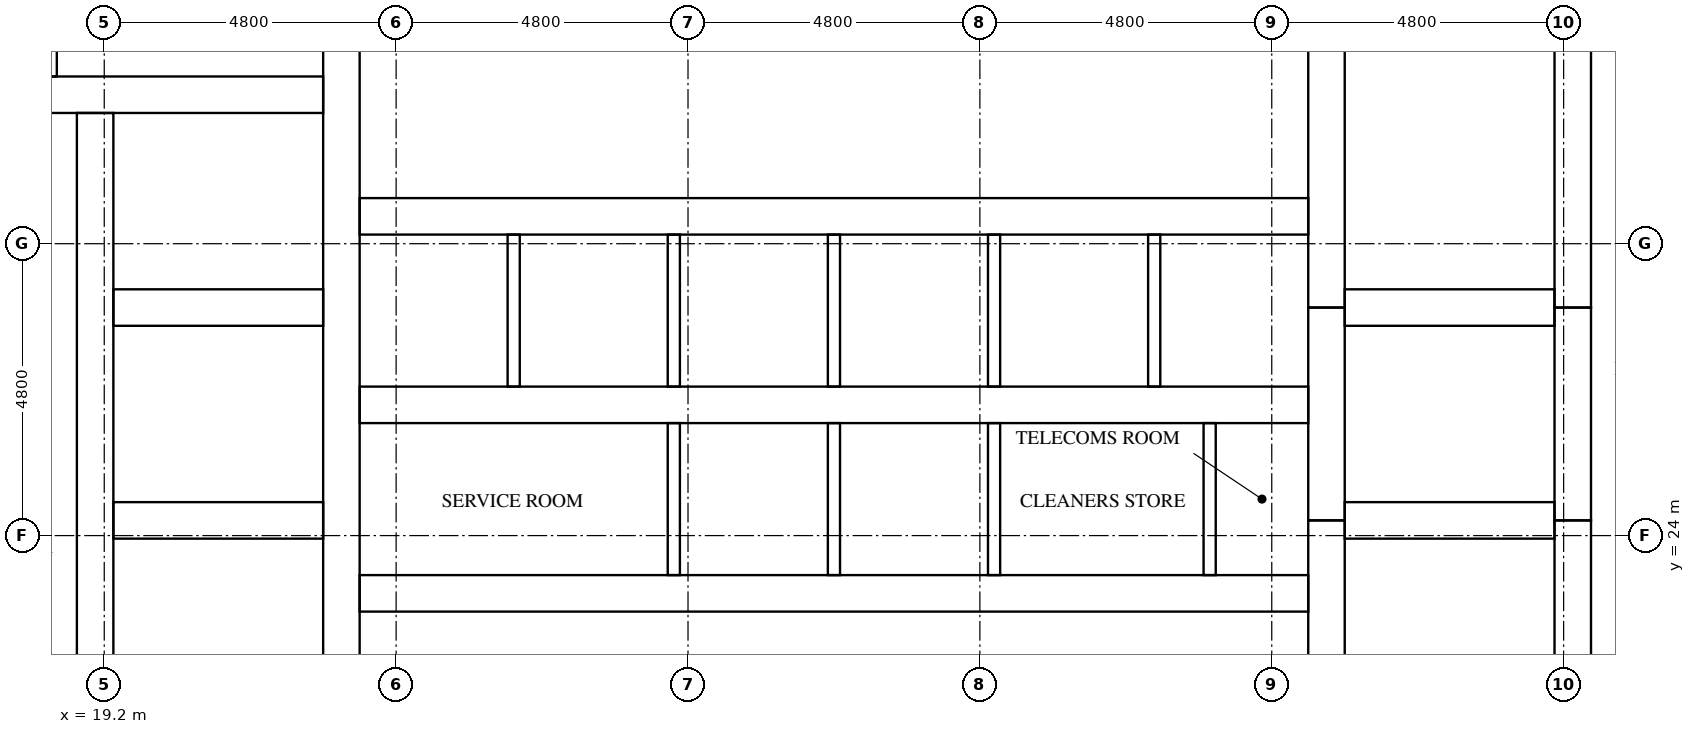
"""IFC4 building model, lengths in metres.
Left out: names, types, materials, properties, quantities, classifications, styles, units other than length and angle.
Written with IfcOpenShell. Run it as: python <this file> out.ifc"""

import sys

from ifc_helpers import new_model, si_unit, direction, frame, frame_2d, origin, place, context, subcontext, project, spatial, rectangle, extrude, element, fill, save


model = new_model("IFC4")
c1 = context("Model", 3, precision=1e-05, world=origin(), true_north=direction((0.0, 1.0)))
c2 = subcontext(c1, "Body", "Model", "MODEL_VIEW")
j1 = project(units=[si_unit("LENGTHUNIT", "METRE"), si_unit("PLANEANGLEUNIT", "RADIAN")], contexts=[c1])
p1 = place(None, origin())
s1 = spatial("IfcSite", under=j1, at=p1, CompositionType="ELEMENT")
p2 = place(p1, origin())
s2 = spatial("IfcBuilding", under=s1, at=p2, CompositionType="ELEMENT")
p3 = place(p2, frame((0.0, 0.0, 149.0)))
s3 = spatial("IfcBuildingStorey", under=s2, at=p3, CompositionType="ELEMENT", Elevation=149.0)
p4 = place(p3, frame((19.05, 15.8, 0.0), z_axis=(0.0, 0.0, 1.0), x_axis=(0.0, 1.0, 0.0)))
e1 = element("IfcWall", 1, at=p4, inside=s3, PredefinedType="SHEAR", context=c2, shape_type="SweptSolid", body=[
    extrude(rectangle(XDim=15.15, YDim=0.6, at=frame_2d((7.575, 0.0))), origin(), (0.0, 0.0, 1.0), 3.2),
])
p5 = place(p4, frame((9.65, 0.0, 0.0)))
e2 = element("IfcOpeningElement", 2, at=p5, cuts=e1, PredefinedType="OPENING", context=c2, shape_type="SweptSolid", body=[
    extrude(rectangle(XDim=1.1, YDim=2.1, at=frame_2d((0.55, 1.05))), frame((0.0, 0.31, 0.0), z_axis=(0.0, -1.0, 0.0), x_axis=(1.0, 0.0, 0.0)), (0.0, 0.0, 1.0), 0.62),
])
p6 = place(p4, frame((13.15, 0.0, 0.0)))
e3 = element("IfcOpeningElement", 3, at=p6, cuts=e1, PredefinedType="OPENING", context=c2, shape_type="SweptSolid", body=[
    extrude(rectangle(XDim=1.1, YDim=2.1, at=frame_2d((0.55, 1.05))), frame((0.0, 0.31, 0.0), z_axis=(0.0, -1.0, 0.0), x_axis=(1.0, 0.0, 0.0)), (0.0, 0.0, 1.0), 0.62),
])
p7 = place(p4, frame((0.4, 0.0, 0.0)))
e4 = element("IfcOpeningElement", 4, at=p7, cuts=e1, PredefinedType="OPENING", context=c2, shape_type="SweptSolid", body=[
    extrude(rectangle(XDim=1.2, YDim=2.1, at=frame_2d((0.6, 1.05))), frame((0.0, 0.31, 0.0), z_axis=(0.0, -1.0, 0.0), x_axis=(1.0, 0.0, 0.0)), (0.0, 0.0, 1.0), 0.62),
])
p8 = place(p3, frame((23.1, 15.8, 0.0), z_axis=(0.0, 0.0, 1.0), x_axis=(0.0, 1.0, 0.0)))
e5 = element("IfcWall", 5, at=p8, inside=s3, PredefinedType="SHEAR", context=c2, shape_type="SweptSolid", body=[
    extrude(rectangle(XDim=21.2, YDim=0.6, at=frame_2d((10.6, 0.0))), origin(), (0.0, 0.0, 1.0), 3.2),
])
p9 = place(p3, frame((39.3, 15.8, 0.0), z_axis=(0.0, 0.0, 1.0), x_axis=(0.0, 1.0, 0.0)))
e6 = element("IfcWall", 6, at=p9, inside=s3, PredefinedType="SHEAR", context=c2, shape_type="SweptSolid", body=[
    extrude(rectangle(XDim=8.45, YDim=0.6, at=frame_2d((4.225, 0.0))), origin(), (0.0, 0.0, 1.0), 3.2),
])
p10 = place(p3, frame((39.3, 24.25, 0.0), z_axis=(0.0, 0.0, 1.0), x_axis=(0.0, 1.0, 0.0)))
e7 = element("IfcWall", 7, at=p10, inside=s3, PredefinedType="SHEAR", context=c2, shape_type="SweptSolid", body=[
    extrude(rectangle(XDim=3.5, YDim=0.6, at=frame_2d((1.75, 0.0))), origin(), (0.0, 0.0, 1.0), 3.2),
])
p11 = place(p3, frame((39.3, 27.75, 0.0), z_axis=(0.0, 0.0, 1.0), x_axis=(0.0, 1.0, 0.0)))
e8 = element("IfcWall", 8, at=p11, inside=s3, PredefinedType="SHEAR", context=c2, shape_type="SweptSolid", body=[
    extrude(rectangle(XDim=9.25, YDim=0.6, at=frame_2d((4.625, 0.0))), origin(), (0.0, 0.0, 1.0), 3.2),
])
p12 = place(p3, frame((43.35, 15.8, 0.0), z_axis=(0.0, 0.0, 1.0), x_axis=(0.0, 1.0, 0.0)))
e9 = element("IfcWall", 9, at=p12, inside=s3, PredefinedType="SHEAR", context=c2, shape_type="SweptSolid", body=[
    extrude(rectangle(XDim=8.45, YDim=0.6, at=frame_2d((4.225, 0.0))), origin(), (0.0, 0.0, 1.0), 3.2),
])
p13 = place(p12, frame((0.4, 0.0, 0.0)))
e10 = element("IfcOpeningElement", 10, at=p13, cuts=e9, PredefinedType="OPENING", context=c2, shape_type="SweptSolid", body=[
    extrude(rectangle(XDim=1.2, YDim=2.1, at=frame_2d((0.6, 1.05))), frame((0.0, 0.31, 0.0), z_axis=(0.0, -1.0, 0.0), x_axis=(1.0, 0.0, 0.0)), (0.0, 0.0, 1.0), 0.62),
])
p14 = place(p3, frame((43.35, 24.25, 0.0), z_axis=(0.0, 0.0, 1.0), x_axis=(0.0, 1.0, 0.0)))
e11 = element("IfcWall", 11, at=p14, inside=s3, PredefinedType="SHEAR", context=c2, shape_type="SweptSolid", body=[
    extrude(rectangle(XDim=3.5, YDim=0.6, at=frame_2d((1.75, 0.0))), origin(), (0.0, 0.0, 1.0), 3.2),
])
p15 = place(p14, frame((1.2, 0.0, 0.0)))
e12 = element("IfcOpeningElement", 12, at=p15, cuts=e11, PredefinedType="OPENING", context=c2, shape_type="SweptSolid", body=[
    extrude(rectangle(XDim=1.1, YDim=2.1, at=frame_2d((0.55, 1.05))), frame((0.0, 0.31, 0.0), z_axis=(0.0, -1.0, 0.0), x_axis=(1.0, 0.0, 0.0)), (0.0, 0.0, 1.0), 0.62),
])
p16 = place(p3, frame((43.35, 27.75, 0.0), z_axis=(0.0, 0.0, 1.0), x_axis=(0.0, 1.0, 0.0)))
e13 = element("IfcWall", 13, at=p16, inside=s3, PredefinedType="SHEAR", context=c2, shape_type="SweptSolid", body=[
    extrude(rectangle(XDim=9.25, YDim=0.6, at=frame_2d((4.625, 0.0))), origin(), (0.0, 0.0, 1.0), 3.2),
])
p17 = place(p16, frame((7.65, 0.0, 0.0)))
e14 = element("IfcOpeningElement", 14, at=p17, cuts=e13, PredefinedType="OPENING", context=c2, shape_type="SweptSolid", body=[
    extrude(rectangle(XDim=1.2, YDim=2.1, at=frame_2d((0.6, 1.05))), frame((0.0, 0.31, 0.0), z_axis=(0.0, -1.0, 0.0), x_axis=(1.0, 0.0, 0.0)), (0.0, 0.0, 1.0), 0.62),
])
for number, where, z_axis, x_axis in (
    (15, (19.35, 24.25, 0.0), (0.0, 0.0, 1.0), (1.0, 0.0, 0.0)),
    (16, (19.35, 27.75, 0.0), (0.0, 0.0, 1.0), (1.0, 0.0, 0.0)),
):
    element("IfcWall", number, at=place(p3, frame(where, z_axis=z_axis, x_axis=x_axis)), inside=s3, PredefinedType="SHEAR", context=c2, shape_type="SweptSolid", body=[
        extrude(rectangle(XDim=3.45, YDim=0.6, at=frame_2d((1.725, 0.0))), origin(), (0.0, 0.0, 1.0), 3.2),
    ])
p18 = place(p3, frame((15.8, 31.25, 0.0), z_axis=(0.0, 0.0, 1.0), x_axis=(1.0, 0.0, 0.0)))
e17 = element("IfcWall", 17, at=p18, inside=s3, PredefinedType="SHEAR", context=c2, shape_type="SweptSolid", body=[
    extrude(rectangle(XDim=7.0, YDim=0.6, at=frame_2d((3.5, 0.0))), origin(), (0.0, 0.0, 1.0), 3.2),
])
for number, where, z_axis, x_axis in (
    (18, (39.6, 24.25, 0.0), (0.0, 0.0, 1.0), (1.0, 0.0, 0.0)),
    (19, (39.6, 27.75, 0.0), (0.0, 0.0, 1.0), (1.0, 0.0, 0.0)),
):
    element("IfcWall", number, at=place(p3, frame(where, z_axis=z_axis, x_axis=x_axis)), inside=s3, PredefinedType="SHEAR", context=c2, shape_type="SweptSolid", body=[
        extrude(rectangle(XDim=3.45, YDim=0.6, at=frame_2d((1.725, 0.0))), origin(), (0.0, 0.0, 1.0), 3.2),
    ])
p19 = place(p3, frame((23.4, 23.05, 0.0), z_axis=(0.0, 0.0, 1.0), x_axis=(1.0, 0.0, 0.0)))
e20 = element("IfcWall", 20, at=p19, inside=s3, PredefinedType="SHEAR", context=c2, shape_type="SweptSolid", body=[
    extrude(rectangle(XDim=15.6, YDim=0.6, at=frame_2d((7.8, 0.0))), origin(), (0.0, 0.0, 1.0), 3.2),
])
p20 = place(p19, frame((2.033, 0.0, 0.0)))
e21 = element("IfcOpeningElement", 21, at=p20, cuts=e20, PredefinedType="OPENING", context=c2, shape_type="SweptSolid", body=[
    extrude(rectangle(XDim=1.0, YDim=2.1, at=frame_2d((0.5, 1.05))), frame((0.0, 0.31, 0.0), z_axis=(0.0, -1.0, 0.0), x_axis=(1.0, 0.0, 0.0)), (0.0, 0.0, 1.0), 0.62),
])
p21 = place(p19, frame((11.706, 0.0, 0.0)))
e22 = element("IfcOpeningElement", 22, at=p21, cuts=e20, PredefinedType="OPENING", context=c2, shape_type="SweptSolid", body=[
    extrude(rectangle(XDim=1.0, YDim=2.1, at=frame_2d((0.5, 1.05))), frame((0.0, 0.31, 0.0), z_axis=(0.0, -1.0, 0.0), x_axis=(1.0, 0.0, 0.0)), (0.0, 0.0, 1.0), 0.62),
])
p22 = place(p19, frame((14.339, 0.0, 0.0)))
e23 = element("IfcOpeningElement", 23, at=p22, cuts=e20, PredefinedType="OPENING", context=c2, shape_type="SweptSolid", body=[
    extrude(rectangle(XDim=1.0, YDim=2.1, at=frame_2d((0.5, 1.05))), frame((0.0, 0.31, 0.0), z_axis=(0.0, -1.0, 0.0), x_axis=(1.0, 0.0, 0.0)), (0.0, 0.0, 1.0), 0.62),
])
p23 = place(p3, frame((23.4, 26.15, 0.0), z_axis=(0.0, 0.0, 1.0), x_axis=(1.0, 0.0, 0.0)))
e24 = element("IfcWall", 24, at=p23, inside=s3, PredefinedType="SHEAR", context=c2, shape_type="SweptSolid", body=[
    extrude(rectangle(XDim=15.6, YDim=0.6, at=frame_2d((7.8, 0.0))), origin(), (0.0, 0.0, 1.0), 3.2),
])
p24 = place(p3, frame((23.4, 29.25, 0.0), z_axis=(0.0, 0.0, 1.0), x_axis=(1.0, 0.0, 0.0)))
e25 = element("IfcWall", 25, at=p24, inside=s3, PredefinedType="SHEAR", context=c2, shape_type="SweptSolid", body=[
    extrude(rectangle(XDim=15.6, YDim=0.6, at=frame_2d((7.8, 0.0))), origin(), (0.0, 0.0, 1.0), 3.2),
])
p25 = place(p24, frame((0.667, 0.0, 0.0)))
e26 = element("IfcOpeningElement", 26, at=p25, cuts=e25, PredefinedType="OPENING", context=c2, shape_type="SweptSolid", body=[
    extrude(rectangle(XDim=1.1, YDim=2.1, at=frame_2d((0.55, 1.05))), frame((0.0, 0.31, 0.0), z_axis=(0.0, -1.0, 0.0), x_axis=(1.0, 0.0, 0.0)), (0.0, 0.0, 1.0), 0.62),
])
p26 = place(p24, frame((3.3, 0.0, 0.0)))
e27 = element("IfcOpeningElement", 27, at=p26, cuts=e25, PredefinedType="OPENING", context=c2, shape_type="SweptSolid", body=[
    extrude(rectangle(XDim=1.1, YDim=2.1, at=frame_2d((0.55, 1.05))), frame((0.0, 0.31, 0.0), z_axis=(0.0, -1.0, 0.0), x_axis=(1.0, 0.0, 0.0)), (0.0, 0.0, 1.0), 0.62),
])
p27 = place(p24, frame((5.933, 0.0, 0.0)))
e28 = element("IfcOpeningElement", 28, at=p27, cuts=e25, PredefinedType="OPENING", context=c2, shape_type="SweptSolid", body=[
    extrude(rectangle(XDim=1.1, YDim=2.1, at=frame_2d((0.55, 1.05))), frame((0.0, 0.31, 0.0), z_axis=(0.0, -1.0, 0.0), x_axis=(1.0, 0.0, 0.0)), (0.0, 0.0, 1.0), 0.62),
])
p28 = place(p24, frame((8.567, 0.0, 0.0)))
e29 = element("IfcOpeningElement", 29, at=p28, cuts=e25, PredefinedType="OPENING", context=c2, shape_type="SweptSolid", body=[
    extrude(rectangle(XDim=1.1, YDim=2.1, at=frame_2d((0.55, 1.05))), frame((0.0, 0.31, 0.0), z_axis=(0.0, -1.0, 0.0), x_axis=(1.0, 0.0, 0.0)), (0.0, 0.0, 1.0), 0.62),
])
p29 = place(p24, frame((11.2, 0.0, 0.0)))
e30 = element("IfcOpeningElement", 30, at=p29, cuts=e25, PredefinedType="OPENING", context=c2, shape_type="SweptSolid", body=[
    extrude(rectangle(XDim=1.1, YDim=2.1, at=frame_2d((0.55, 1.05))), frame((0.0, 0.31, 0.0), z_axis=(0.0, -1.0, 0.0), x_axis=(1.0, 0.0, 0.0)), (0.0, 0.0, 1.0), 0.62),
])
p30 = place(p24, frame((13.833, 0.0, 0.0)))
e31 = element("IfcOpeningElement", 31, at=p30, cuts=e25, PredefinedType="OPENING", context=c2, shape_type="SweptSolid", body=[
    extrude(rectangle(XDim=1.1, YDim=2.1, at=frame_2d((0.55, 1.05))), frame((0.0, 0.31, 0.0), z_axis=(0.0, -1.0, 0.0), x_axis=(1.0, 0.0, 0.0)), (0.0, 0.0, 1.0), 0.62),
])
for number, where, z_axis, x_axis in (
    (32, (25.933, 26.45, 0.0), (0.0, 0.0, 1.0), (0.0, 1.0, 0.0)),
    (33, (28.567, 23.35, 0.0), (0.0, 0.0, 1.0), (0.0, 1.0, 0.0)),
    (34, (28.567, 26.45, 0.0), (0.0, 0.0, 1.0), (0.0, 1.0, 0.0)),
    (35, (31.2, 23.35, 0.0), (0.0, 0.0, 1.0), (0.0, 1.0, 0.0)),
    (36, (31.2, 26.45, 0.0), (0.0, 0.0, 1.0), (0.0, 1.0, 0.0)),
    (37, (33.833, 23.35, 0.0), (0.0, 0.0, 1.0), (0.0, 1.0, 0.0)),
    (38, (33.833, 26.45, 0.0), (0.0, 0.0, 1.0), (0.0, 1.0, 0.0)),
    (39, (36.467, 26.45, 0.0), (0.0, 0.0, 1.0), (0.0, 1.0, 0.0)),
):
    element("IfcWall", number, at=place(p3, frame(where, z_axis=z_axis, x_axis=x_axis)), inside=s3, PredefinedType="SOLIDWALL", context=c2, shape_type="SweptSolid", body=[
        extrude(rectangle(XDim=2.5, YDim=0.2, at=frame_2d((1.25, 0.0))), origin(), (0.0, 0.0, 1.0), 3.2),
    ])
p31 = place(p3, frame((18.32, 31.55, 0.0), z_axis=(0.0, 0.0, 1.0), x_axis=(0.0, 1.0, 0.0)))
e40 = element("IfcWall", 40, at=p31, inside=s3, PredefinedType="PARTITIONING", context=c2, shape_type="SweptSolid", body=[
    extrude(rectangle(XDim=5.45, YDim=0.2, at=frame_2d((2.725, 0.0))), origin(), (0.0, 0.0, 1.0), 3.2),
])
p32 = place(p3, frame((37.379, 23.35, 0.0), z_axis=(0.0, 0.0, 1.0), x_axis=(0.0, 1.0, 0.0)))
e41 = element("IfcWall", 41, at=p32, inside=s3, PredefinedType="PARTITIONING", context=c2, shape_type="SweptSolid", body=[
    extrude(rectangle(XDim=2.5, YDim=0.2, at=frame_2d((1.25, 0.0))), origin(), (0.0, 0.0, 1.0), 3.2),
])
p33 = place(p25, origin())
e42 = element("IfcDoor", 42, at=p33, inside=s3, OperationType="DOUBLE_DOOR_SLIDING", PredefinedType="DOOR", context=c2, shape_type="SweptSolid", body=[
    extrude(rectangle(XDim=1.1, YDim=2.1, at=frame_2d((0.55, 1.05))), frame((0.0, 0.025, 0.0), z_axis=(0.0, -1.0, 0.0), x_axis=(1.0, 0.0, 0.0)), (0.0, 0.0, 1.0), 0.05),
])
fill(e26, e42)
p34 = place(p26, origin())
e43 = element("IfcDoor", 43, at=p34, inside=s3, OperationType="DOUBLE_DOOR_SLIDING", PredefinedType="DOOR", context=c2, shape_type="SweptSolid", body=[
    extrude(rectangle(XDim=1.1, YDim=2.1, at=frame_2d((0.55, 1.05))), frame((0.0, 0.025, 0.0), z_axis=(0.0, -1.0, 0.0), x_axis=(1.0, 0.0, 0.0)), (0.0, 0.0, 1.0), 0.05),
])
fill(e27, e43)
p35 = place(p27, origin())
e44 = element("IfcDoor", 44, at=p35, inside=s3, OperationType="DOUBLE_DOOR_SLIDING", PredefinedType="DOOR", context=c2, shape_type="SweptSolid", body=[
    extrude(rectangle(XDim=1.1, YDim=2.1, at=frame_2d((0.55, 1.05))), frame((0.0, 0.025, 0.0), z_axis=(0.0, -1.0, 0.0), x_axis=(1.0, 0.0, 0.0)), (0.0, 0.0, 1.0), 0.05),
])
fill(e28, e44)
p36 = place(p28, origin())
e45 = element("IfcDoor", 45, at=p36, inside=s3, OperationType="DOUBLE_DOOR_SLIDING", PredefinedType="DOOR", context=c2, shape_type="SweptSolid", body=[
    extrude(rectangle(XDim=1.1, YDim=2.1, at=frame_2d((0.55, 1.05))), frame((0.0, 0.025, 0.0), z_axis=(0.0, -1.0, 0.0), x_axis=(1.0, 0.0, 0.0)), (0.0, 0.0, 1.0), 0.05),
])
fill(e29, e45)
p37 = place(p29, origin())
e46 = element("IfcDoor", 46, at=p37, inside=s3, OperationType="DOUBLE_DOOR_SLIDING", PredefinedType="DOOR", context=c2, shape_type="SweptSolid", body=[
    extrude(rectangle(XDim=1.1, YDim=2.1, at=frame_2d((0.55, 1.05))), frame((0.0, 0.025, 0.0), z_axis=(0.0, -1.0, 0.0), x_axis=(1.0, 0.0, 0.0)), (0.0, 0.0, 1.0), 0.05),
])
fill(e30, e46)
p38 = place(p30, origin())
e47 = element("IfcDoor", 47, at=p38, inside=s3, OperationType="DOUBLE_DOOR_SLIDING", PredefinedType="DOOR", context=c2, shape_type="SweptSolid", body=[
    extrude(rectangle(XDim=1.1, YDim=2.1, at=frame_2d((0.55, 1.05))), frame((0.0, 0.025, 0.0), z_axis=(0.0, -1.0, 0.0), x_axis=(1.0, 0.0, 0.0)), (0.0, 0.0, 1.0), 0.05),
])
fill(e31, e47)
p39 = place(p5, origin())
e48 = element("IfcDoor", 48, at=p39, inside=s3, OperationType="DOUBLE_DOOR_SLIDING", PredefinedType="DOOR", context=c2, shape_type="SweptSolid", body=[
    extrude(rectangle(XDim=1.1, YDim=2.1, at=frame_2d((0.55, 1.05))), frame((0.0, 0.025, 0.0), z_axis=(0.0, -1.0, 0.0), x_axis=(1.0, 0.0, 0.0)), (0.0, 0.0, 1.0), 0.05),
])
fill(e2, e48)
p40 = place(p6, origin())
e49 = element("IfcDoor", 49, at=p40, inside=s3, OperationType="DOUBLE_DOOR_SLIDING", PredefinedType="DOOR", context=c2, shape_type="SweptSolid", body=[
    extrude(rectangle(XDim=1.1, YDim=2.1, at=frame_2d((0.55, 1.05))), frame((0.0, 0.025, 0.0), z_axis=(0.0, -1.0, 0.0), x_axis=(1.0, 0.0, 0.0)), (0.0, 0.0, 1.0), 0.05),
])
fill(e3, e49)
p41 = place(p15, origin())
e50 = element("IfcDoor", 50, at=p41, inside=s3, OperationType="DOUBLE_DOOR_SLIDING", PredefinedType="DOOR", context=c2, shape_type="SweptSolid", body=[
    extrude(rectangle(XDim=1.1, YDim=2.1, at=frame_2d((0.55, 1.05))), frame((0.0, 0.025, 0.0), z_axis=(0.0, -1.0, 0.0), x_axis=(1.0, 0.0, 0.0)), (0.0, 0.0, 1.0), 0.05),
])
fill(e12, e50)
p42 = place(p20, frame((1.0, 0.0, 0.0), z_axis=(0.0, 0.0, 1.0), x_axis=(-1.0, 0.0, 0.0)))
e51 = element("IfcDoor", 51, at=p42, inside=s3, OperationType="SINGLE_SWING_LEFT", PredefinedType="DOOR", context=c2, shape_type="SweptSolid", body=[
    extrude(rectangle(XDim=1.0, YDim=2.1, at=frame_2d((0.5, 1.05))), frame((0.0, 0.025, 0.0), z_axis=(0.0, -1.0, 0.0), x_axis=(1.0, 0.0, 0.0)), (0.0, 0.0, 1.0), 0.05),
])
fill(e21, e51)
p43 = place(p21, frame((1.0, 0.0, 0.0), z_axis=(0.0, 0.0, 1.0), x_axis=(-1.0, 0.0, 0.0)))
e52 = element("IfcDoor", 52, at=p43, inside=s3, OperationType="SINGLE_SWING_RIGHT", PredefinedType="DOOR", context=c2, shape_type="SweptSolid", body=[
    extrude(rectangle(XDim=1.0, YDim=2.1, at=frame_2d((0.5, 1.05))), frame((0.0, 0.025, 0.0), z_axis=(0.0, -1.0, 0.0), x_axis=(1.0, 0.0, 0.0)), (0.0, 0.0, 1.0), 0.05),
])
fill(e22, e52)
p44 = place(p22, frame((1.0, 0.0, 0.0), z_axis=(0.0, 0.0, 1.0), x_axis=(-1.0, 0.0, 0.0)))
e53 = element("IfcDoor", 53, at=p44, inside=s3, OperationType="SINGLE_SWING_LEFT", PredefinedType="DOOR", context=c2, shape_type="SweptSolid", body=[
    extrude(rectangle(XDim=1.0, YDim=2.1, at=frame_2d((0.5, 1.05))), frame((0.0, 0.025, 0.0), z_axis=(0.0, -1.0, 0.0), x_axis=(1.0, 0.0, 0.0)), (0.0, 0.0, 1.0), 0.05),
])
fill(e23, e53)
save(model, sys.argv[1])
